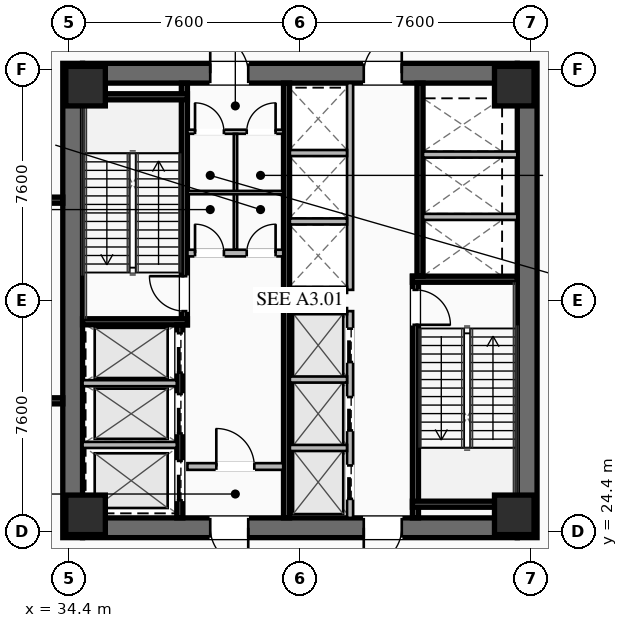
"""IFC4 building model, lengths in metres.
Left out: names, types, materials, properties, quantities, classifications, styles, units other than length and angle.
Written with IfcOpenShell. Run it as: python <this file> out.ifc"""

import sys

from ifc_helpers import new_model, si_unit, direction, frame, frame_2d, origin, origin_2d, place, context, subcontext, project, spatial, rectangle, hollow_rectangle, extrude, element, fill, save


model = new_model("IFC4")
c1 = context("Model", 3, precision=1e-05, world=origin(), true_north=direction((0.0, 1.0)))
c2 = subcontext(c1, "Body", "Model", "MODEL_VIEW")
j1 = project(units=[si_unit("LENGTHUNIT", "METRE"), si_unit("PLANEANGLEUNIT", "RADIAN")], contexts=[c1])
p1 = place(None, origin())
s1 = spatial("IfcSite", under=j1, at=p1, CompositionType="ELEMENT")
p2 = place(p1, origin())
s2 = spatial("IfcBuilding", under=s1, at=p2, CompositionType="ELEMENT")
p3 = place(p2, frame((0.0, 0.0, -5.5)))
s3 = spatial("IfcBuildingStorey", under=s2, at=p3, CompositionType="ELEMENT", Elevation=-5.5)
for number, where, z_axis, x_axis in (
    (1, (34.525, 24.2, 0.0), (0.0, 0.0, 1.0), (0.0, 1.0, 0.0)),
    (2, (49.475, 39.8, 0.0), (0.0, 0.0, 1.0), (0.0, -1.0, 0.0)),
):
    element("IfcWall", number, at=place(p3, frame(where, z_axis=z_axis, x_axis=x_axis)), inside=s3, PredefinedType="SHEAR", context=c2, shape_type="SweptSolid", body=[
        extrude(rectangle(XDim=15.6, YDim=0.65, at=frame_2d((7.8, 0.0))), origin(), (0.0, 0.0, 1.0), 5.5),
    ])
p4 = place(p3, frame((49.15, 24.525, 0.0), z_axis=(0.0, 0.0, 1.0), x_axis=(-1.0, 0.0, 0.0)))
e3 = element("IfcWall", 3, at=p4, inside=s3, PredefinedType="SHEAR", context=c2, shape_type="SweptSolid", body=[
    extrude(rectangle(XDim=14.3, YDim=0.65, at=frame_2d((7.15, 0.0))), origin(), (0.0, 0.0, 1.0), 5.5),
])
p5 = place(p4, frame((8.85, 0.0, 0.0)))
e4 = element("IfcOpeningElement", 4, at=p5, cuts=e3, PredefinedType="OPENING", context=c2, shape_type="SweptSolid", body=[
    extrude(rectangle(XDim=1.25, YDim=2.25, at=frame_2d((0.625, 1.125))), frame((0.0, 0.335, 0.0), z_axis=(0.0, -1.0, 0.0), x_axis=(1.0, 0.0, 0.0)), (0.0, 0.0, 1.0), 0.67),
])
p6 = place(p4, frame((3.8, 0.0, 0.0)))
e5 = element("IfcOpeningElement", 5, at=p6, cuts=e3, PredefinedType="OPENING", context=c2, shape_type="SweptSolid", body=[
    extrude(rectangle(XDim=1.25, YDim=2.25, at=frame_2d((0.625, 1.125))), frame((0.0, 0.335, 0.0), z_axis=(0.0, -1.0, 0.0), x_axis=(1.0, 0.0, 0.0)), (0.0, 0.0, 1.0), 0.67),
])
p7 = place(p3, frame((34.85, 39.475, 0.0), z_axis=(0.0, 0.0, 1.0), x_axis=(1.0, 0.0, 0.0)))
e6 = element("IfcWall", 6, at=p7, inside=s3, PredefinedType="SHEAR", context=c2, shape_type="SweptSolid", body=[
    extrude(rectangle(XDim=14.3, YDim=0.65, at=frame_2d((7.15, 0.0))), origin(), (0.0, 0.0, 1.0), 5.5),
])
p8 = place(p7, frame((4.2, 0.0, 0.0)))
e7 = element("IfcOpeningElement", 7, at=p8, cuts=e6, PredefinedType="OPENING", context=c2, shape_type="SweptSolid", body=[
    extrude(rectangle(XDim=1.25, YDim=2.25, at=frame_2d((0.625, 1.125))), frame((0.0, 0.335, 0.0), z_axis=(0.0, -1.0, 0.0), x_axis=(1.0, 0.0, 0.0)), (0.0, 0.0, 1.0), 0.67),
])
p9 = place(p7, frame((9.25, 0.0, 0.0)))
e8 = element("IfcOpeningElement", 8, at=p9, cuts=e6, PredefinedType="OPENING", context=c2, shape_type="SweptSolid", body=[
    extrude(rectangle(XDim=1.25, YDim=2.25, at=frame_2d((0.625, 1.125))), frame((0.0, 0.335, 0.0), z_axis=(0.0, -1.0, 0.0), x_axis=(1.0, 0.0, 0.0)), (0.0, 0.0, 1.0), 0.67),
])
for number, where, z_axis, x_axis in (
    (9, (34.95, 24.95, 0.0), (0.0, 0.0, 1.0), (1.0, 0.0, 0.0)),
    (10, (49.05, 24.95, 0.0), (0.0, 0.0, 1.0), (1.0, 0.0, 0.0)),
    (11, (49.05, 39.05, 0.0), (0.0, 0.0, 1.0), (1.0, 0.0, 0.0)),
    (12, (34.95, 39.05, 0.0), (0.0, 0.0, 1.0), (1.0, 0.0, 0.0)),
):
    element("IfcColumn", number, at=place(p3, frame(where, z_axis=z_axis, x_axis=x_axis)), inside=s3, PredefinedType="COLUMN", context=c2, shape_type="SweptSolid", body=[
        extrude(hollow_rectangle(XDim=1.3, YDim=1.3, WallThickness=0.05, at=origin_2d()), origin(), (0.0, 0.0, 1.0), 5.2),
    ])
p10 = place(p3, frame((38.2, 31.2, 0.0), z_axis=(0.0, 0.0, 1.0), x_axis=(0.0, 1.0, 0.0)))
e13 = element("IfcWall", 13, at=p10, inside=s3, PredefinedType="SHEAR", context=c2, shape_type="SweptSolid", body=[
    extrude(rectangle(XDim=7.95, YDim=0.2, at=frame_2d((3.975, 0.0))), origin(), (0.0, 0.0, 1.0), 5.2),
])
p11 = place(p10, frame((0.45, 0.0, 0.0)))
e14 = element("IfcOpeningElement", 14, at=p11, cuts=e13, PredefinedType="OPENING", context=c2, shape_type="SweptSolid", body=[
    extrude(rectangle(XDim=1.15, YDim=2.2, at=frame_2d((0.575, 1.1))), frame((0.0, 0.11, 0.0), z_axis=(0.0, -1.0, 0.0), x_axis=(1.0, 0.0, 0.0)), (0.0, 0.0, 1.0), 0.22),
])
for number, where, z_axis, x_axis in (
    (15, (34.85, 31.3, 0.0), (0.0, 0.0, 1.0), (1.0, 0.0, 0.0)),
    (16, (34.85, 38.7, 0.0), (0.0, 0.0, 1.0), (1.0, 0.0, 0.0)),
):
    element("IfcWall", number, at=place(p3, frame(where, z_axis=z_axis, x_axis=x_axis)), inside=s3, PredefinedType="SHEAR", context=c2, shape_type="SweptSolid", body=[
        extrude(rectangle(XDim=3.45, YDim=0.2, at=frame_2d((1.725, 0.0))), origin(), (0.0, 0.0, 1.0), 5.2),
    ])
p12 = place(p3, frame((45.8, 32.8, 0.0), z_axis=(0.0, 0.0, 1.0), x_axis=(0.0, -1.0, 0.0)))
e17 = element("IfcWall", 17, at=p12, inside=s3, PredefinedType="SHEAR", context=c2, shape_type="SweptSolid", body=[
    extrude(rectangle(XDim=7.95, YDim=0.2, at=frame_2d((3.975, 0.0))), origin(), (0.0, 0.0, 1.0), 5.2),
])
p13 = place(p12, frame((0.45, 0.0, 0.0)))
e18 = element("IfcOpeningElement", 18, at=p13, cuts=e17, PredefinedType="OPENING", context=c2, shape_type="SweptSolid", body=[
    extrude(rectangle(XDim=1.15, YDim=2.2, at=frame_2d((0.575, 1.1))), frame((0.0, 0.11, 0.0), z_axis=(0.0, -1.0, 0.0), x_axis=(1.0, 0.0, 0.0)), (0.0, 0.0, 1.0), 0.22),
])
for number, where, z_axis, x_axis in (
    (19, (45.7, 32.7, 0.0), (0.0, 0.0, 1.0), (1.0, 0.0, 0.0)),
    (20, (45.7, 25.3, 0.0), (0.0, 0.0, 1.0), (1.0, 0.0, 0.0)),
):
    element("IfcWall", number, at=place(p3, frame(where, z_axis=z_axis, x_axis=x_axis)), inside=s3, PredefinedType="SHEAR", context=c2, shape_type="SweptSolid", body=[
        extrude(rectangle(XDim=3.45, YDim=0.2, at=frame_2d((1.725, 0.0))), origin(), (0.0, 0.0, 1.0), 5.2),
    ])
p14 = place(p3, frame((41.56, 24.85, 0.0), z_axis=(0.0, 0.0, 1.0), x_axis=(0.0, 1.0, 0.0)))
e21 = element("IfcWall", 21, at=p14, inside=s3, PredefinedType="SHEAR", context=c2, shape_type="SweptSolid", body=[
    extrude(rectangle(XDim=14.3, YDim=0.2, at=frame_2d((7.15, 0.0))), origin(), (0.0, 0.0, 1.0), 5.2),
])
p15 = place(p3, frame((38.3, 33.56, 0.0), z_axis=(0.0, 0.0, 1.0), x_axis=(1.0, 0.0, 0.0)))
e22 = element("IfcWall", 22, at=p15, inside=s3, PredefinedType="SOLIDWALL", context=c2, shape_type="SweptSolid", body=[
    extrude(rectangle(XDim=3.15, YDim=0.22, at=frame_2d((1.575, 0.0))), origin(), (0.0, 0.0, 1.0), 4.243),
])
p16 = place(p15, frame((0.25, 0.0, 0.0)))
e23 = element("IfcOpeningElement", 23, at=p16, cuts=e22, PredefinedType="OPENING", context=c2, shape_type="SweptSolid", body=[
    extrude(rectangle(XDim=0.95, YDim=2.05, at=frame_2d((0.475, 1.025))), frame((0.0, 0.12, 0.0), z_axis=(0.0, -1.0, 0.0), x_axis=(1.0, 0.0, 0.0)), (0.0, 0.0, 1.0), 0.24),
])
p17 = place(p15, frame((1.95, 0.0, 0.0)))
e24 = element("IfcOpeningElement", 24, at=p17, cuts=e22, PredefinedType="OPENING", context=c2, shape_type="SweptSolid", body=[
    extrude(rectangle(XDim=0.95, YDim=2.05, at=frame_2d((0.475, 1.025))), frame((0.0, 0.12, 0.0), z_axis=(0.0, -1.0, 0.0), x_axis=(1.0, 0.0, 0.0)), (0.0, 0.0, 1.0), 0.24),
])
p18 = place(p3, frame((38.3, 26.54, 0.0), z_axis=(0.0, 0.0, 1.0), x_axis=(1.0, 0.0, 0.0)))
e25 = element("IfcWall", 25, at=p18, inside=s3, PredefinedType="SOLIDWALL", context=c2, shape_type="SweptSolid", body=[
    extrude(rectangle(XDim=3.15, YDim=0.22, at=frame_2d((1.575, 0.0))), origin(), (0.0, 0.0, 1.0), 4.243),
])
p19 = place(p18, frame((0.95, 0.0, 0.0)))
e26 = element("IfcOpeningElement", 26, at=p19, cuts=e25, PredefinedType="OPENING", context=c2, shape_type="SweptSolid", body=[
    extrude(rectangle(XDim=1.25, YDim=2.25, at=frame_2d((0.625, 1.125))), frame((0.0, 0.12, 0.0), z_axis=(0.0, -1.0, 0.0), x_axis=(1.0, 0.0, 0.0)), (0.0, 0.0, 1.0), 0.24),
])
p20 = place(p3, frame((38.05, 24.85, 0.0), z_axis=(0.0, 0.0, 1.0), x_axis=(0.0, 1.0, 0.0)))
e27 = element("IfcWall", 27, at=p20, inside=s3, PredefinedType="SHEAR", context=c2, shape_type="SweptSolid", body=[
    extrude(rectangle(XDim=6.35, YDim=0.2, at=frame_2d((3.175, 0.0))), origin(), (0.0, 0.0, 1.0), 5.2),
])
p21 = place(p20, frame((4.775, 0.0, 0.0)))
e28 = element("IfcOpeningElement", 28, at=p21, cuts=e27, PredefinedType="OPENING", context=c2, shape_type="SweptSolid", body=[
    extrude(rectangle(XDim=1.3, YDim=2.25, at=frame_2d((0.65, 1.125))), frame((0.0, 0.11, 0.0), z_axis=(0.0, -1.0, 0.0), x_axis=(1.0, 0.0, 0.0)), (0.0, 0.0, 1.0), 0.22),
])
p22 = place(p20, frame((2.775, 0.0, 0.0)))
e29 = element("IfcOpeningElement", 29, at=p22, cuts=e27, PredefinedType="OPENING", context=c2, shape_type="SweptSolid", body=[
    extrude(rectangle(XDim=1.3, YDim=2.25, at=frame_2d((0.65, 1.125))), frame((0.0, 0.11, 0.0), z_axis=(0.0, -1.0, 0.0), x_axis=(1.0, 0.0, 0.0)), (0.0, 0.0, 1.0), 0.22),
])
p23 = place(p20, frame((0.575, 0.0, 0.0)))
e30 = element("IfcOpeningElement", 30, at=p23, cuts=e27, PredefinedType="OPENING", context=c2, shape_type="SweptSolid", body=[
    extrude(rectangle(XDim=1.3, YDim=2.25, at=frame_2d((0.65, 1.125))), frame((0.0, 0.11, 0.0), z_axis=(0.0, -1.0, 0.0), x_axis=(1.0, 0.0, 0.0)), (0.0, 0.0, 1.0), 0.22),
])
for number, where, z_axis, x_axis in (
    (31, (34.85, 27.25, 0.0), (0.0, 0.0, 1.0), (1.0, 0.0, 0.0)),
    (32, (34.85, 29.28, 0.0), (0.0, 0.0, 1.0), (1.0, 0.0, 0.0)),
):
    element("IfcWall", number, at=place(p3, frame(where, z_axis=z_axis, x_axis=x_axis)), inside=s3, PredefinedType="SOLIDWALL", context=c2, shape_type="SweptSolid", body=[
        extrude(rectangle(XDim=3.1, YDim=0.2, at=frame_2d((1.55, 0.0))), origin(), (0.0, 0.0, 1.0), 5.2),
    ])
p24 = place(p3, frame((45.95, 39.15, 0.0), z_axis=(0.0, 0.0, 1.0), x_axis=(0.0, -1.0, 0.0)))
e33 = element("IfcWall", 33, at=p24, inside=s3, PredefinedType="SHEAR", context=c2, shape_type="SweptSolid", body=[
    extrude(rectangle(XDim=6.35, YDim=0.2, at=frame_2d((3.175, 0.0))), origin(), (0.0, 0.0, 1.0), 5.2),
])
for number, where, z_axis, x_axis in (
    (34, (46.05, 34.75, 0.0), (0.0, 0.0, 1.0), (1.0, 0.0, 0.0)),
    (35, (46.05, 36.8, 0.0), (0.0, 0.0, 1.0), (1.0, 0.0, 0.0)),
):
    element("IfcWall", number, at=place(p3, frame(where, z_axis=z_axis, x_axis=x_axis)), inside=s3, PredefinedType="SOLIDWALL", context=c2, shape_type="SweptSolid", body=[
        extrude(rectangle(XDim=3.1, YDim=0.2, at=frame_2d((1.55, 0.0))), origin(), (0.0, 0.0, 1.0), 5.2),
    ])
p25 = place(p3, frame((38.3, 37.55, 0.0), z_axis=(0.0, 0.0, 1.0), x_axis=(1.0, 0.0, 0.0)))
e36 = element("IfcWall", 36, at=p25, inside=s3, PredefinedType="PARTITIONING", context=c2, shape_type="SweptSolid", body=[
    extrude(rectangle(XDim=3.15, YDim=0.135, at=frame_2d((1.575, 0.0))), origin(), (0.0, 0.0, 1.0), 4.243),
])
p26 = place(p25, frame((0.25, 0.0, 0.0)))
e37 = element("IfcOpeningElement", 37, at=p26, cuts=e36, PredefinedType="OPENING", context=c2, shape_type="SweptSolid", body=[
    extrude(rectangle(XDim=0.95, YDim=2.05, at=frame_2d((0.475, 1.025))), frame((0.0, 0.077, 0.0), z_axis=(0.0, -1.0, 0.0), x_axis=(1.0, 0.0, 0.0)), (0.0, 0.0, 1.0), 0.155),
])
p27 = place(p25, frame((1.95, 0.0, 0.0)))
e38 = element("IfcOpeningElement", 38, at=p27, cuts=e36, PredefinedType="OPENING", context=c2, shape_type="SweptSolid", body=[
    extrude(rectangle(XDim=0.95, YDim=2.05, at=frame_2d((0.475, 1.025))), frame((0.0, 0.077, 0.0), z_axis=(0.0, -1.0, 0.0), x_axis=(1.0, 0.0, 0.0)), (0.0, 0.0, 1.0), 0.155),
])
p28 = place(p3, frame((39.88, 33.68, 0.0), z_axis=(0.0, 0.0, 1.0), x_axis=(0.0, 1.0, 0.0)))
e39 = element("IfcWall", 39, at=p28, inside=s3, PredefinedType="PARTITIONING", context=c2, shape_type="SweptSolid", body=[
    extrude(rectangle(XDim=3.8, YDim=0.11, at=frame_2d((1.9, 0.0))), origin(), (0.0, 0.0, 1.0), 4.243),
])
p29 = place(p3, frame((38.3, 35.55, 0.0), z_axis=(0.0, 0.0, 1.0), x_axis=(1.0, 0.0, 0.0)))
e40 = element("IfcWall", 40, at=p29, inside=s3, PredefinedType="PARTITIONING", context=c2, shape_type="SweptSolid", body=[
    extrude(rectangle(XDim=3.15, YDim=0.11, at=frame_2d((1.575, 0.0))), origin(), (0.0, 0.0, 1.0), 4.243),
])
p30 = place(p3, frame((43.65, 24.85, 0.0), z_axis=(0.0, 0.0, 1.0), x_axis=(0.0, 1.0, 0.0)))
e41 = element("IfcWall", 41, at=p30, inside=s3, PredefinedType="SOLIDWALL", context=c2, shape_type="SweptSolid", body=[
    extrude(rectangle(XDim=6.8, YDim=0.2, at=frame_2d((3.4, 0.0))), origin(), (0.0, 0.0, 1.0), 5.2),
])
p31 = place(p30, frame((0.625, 0.0, 0.0)))
e42 = element("IfcOpeningElement", 42, at=p31, cuts=e41, PredefinedType="OPENING", context=c2, shape_type="SweptSolid", body=[
    extrude(rectangle(XDim=1.1, YDim=2.2, at=frame_2d((0.55, 1.1))), frame((0.0, 0.11, 0.0), z_axis=(0.0, -1.0, 0.0), x_axis=(1.0, 0.0, 0.0)), (0.0, 0.0, 1.0), 0.22),
])
p32 = place(p30, frame((2.875, 0.0, 0.0)))
e43 = element("IfcOpeningElement", 43, at=p32, cuts=e41, PredefinedType="OPENING", context=c2, shape_type="SweptSolid", body=[
    extrude(rectangle(XDim=1.1, YDim=2.2, at=frame_2d((0.55, 1.1))), frame((0.0, 0.11, 0.0), z_axis=(0.0, -1.0, 0.0), x_axis=(1.0, 0.0, 0.0)), (0.0, 0.0, 1.0), 0.22),
])
p33 = place(p30, frame((5.125, 0.0, 0.0)))
e44 = element("IfcOpeningElement", 44, at=p33, cuts=e41, PredefinedType="OPENING", context=c2, shape_type="SweptSolid", body=[
    extrude(rectangle(XDim=1.1, YDim=2.2, at=frame_2d((0.55, 1.1))), frame((0.0, 0.11, 0.0), z_axis=(0.0, -1.0, 0.0), x_axis=(1.0, 0.0, 0.0)), (0.0, 0.0, 1.0), 0.22),
])
for number, where, z_axis, x_axis in (
    (45, (41.67, 27.15, 0.0), (0.0, 0.0, 1.0), (1.0, 0.0, 0.0)),
    (46, (41.67, 29.4, 0.0), (0.0, 0.0, 1.0), (1.0, 0.0, 0.0)),
    (47, (41.67, 31.65, 0.0), (0.0, 0.0, 1.0), (1.0, 0.0, 0.0)),
):
    element("IfcWall", number, at=place(p3, frame(where, z_axis=z_axis, x_axis=x_axis)), inside=s3, PredefinedType="SOLIDWALL", context=c2, shape_type="SweptSolid", body=[
        extrude(rectangle(XDim=1.88, YDim=0.2, at=frame_2d((0.94, 0.0))), origin(), (0.0, 0.0, 1.0), 5.2),
    ])
p34 = place(p3, frame((43.65, 32.35, 0.0), z_axis=(0.0, 0.0, 1.0), x_axis=(0.0, 1.0, 0.0)))
e48 = element("IfcWall", 48, at=p34, inside=s3, PredefinedType="SOLIDWALL", context=c2, shape_type="SweptSolid", body=[
    extrude(rectangle(XDim=6.8, YDim=0.2, at=frame_2d((3.4, 0.0))), origin(), (0.0, 0.0, 1.0), 5.2),
])
for number, where, z_axis, x_axis in (
    (49, (41.67, 32.35, 0.0), (0.0, 0.0, 1.0), (1.0, 0.0, 0.0)),
    (50, (41.67, 34.6, 0.0), (0.0, 0.0, 1.0), (1.0, 0.0, 0.0)),
    (51, (41.67, 36.85, 0.0), (0.0, 0.0, 1.0), (1.0, 0.0, 0.0)),
):
    element("IfcWall", number, at=place(p3, frame(where, z_axis=z_axis, x_axis=x_axis)), inside=s3, PredefinedType="SOLIDWALL", context=c2, shape_type="SweptSolid", body=[
        extrude(rectangle(XDim=1.88, YDim=0.2, at=frame_2d((0.94, 0.0))), origin(), (0.0, 0.0, 1.0), 5.2),
    ])
for number, where, z_axis, x_axis in (
    (52, (30.8, 35.3, 0.0), (0.0, 0.0, 1.0), (1.0, 0.0, 0.0)),
    (53, (30.8, 28.7, 0.0), (0.0, 0.0, 1.0), (1.0, 0.0, 0.0)),
):
    element("IfcWall", number, at=place(p3, frame(where, z_axis=z_axis, x_axis=x_axis)), inside=s3, PredefinedType="SHEAR", context=c2, shape_type="SweptSolid", body=[
        extrude(rectangle(XDim=3.4, YDim=0.2, at=frame_2d((1.7, 0.0))), origin(), (0.0, 0.0, 1.0), 5.2),
    ])
p35 = place(p8, origin())
e54 = element("IfcDoor", 54, at=p35, inside=s3, OperationType="SINGLE_SWING_LEFT", PredefinedType="DOOR", context=c2, shape_type="SweptSolid", body=[
    extrude(rectangle(XDim=1.25, YDim=2.25, at=frame_2d((0.625, 1.125))), frame((0.0, 0.025, 0.0), z_axis=(0.0, -1.0, 0.0), x_axis=(1.0, 0.0, 0.0)), (0.0, 0.0, 1.0), 0.05),
])
fill(e7, e54)
p36 = place(p9, origin())
e55 = element("IfcDoor", 55, at=p36, inside=s3, OperationType="SINGLE_SWING_RIGHT", PredefinedType="DOOR", context=c2, shape_type="SweptSolid", body=[
    extrude(rectangle(XDim=1.25, YDim=2.25, at=frame_2d((0.625, 1.125))), frame((0.0, 0.025, 0.0), z_axis=(0.0, -1.0, 0.0), x_axis=(1.0, 0.0, 0.0)), (0.0, 0.0, 1.0), 0.05),
])
fill(e8, e55)
p37 = place(p5, origin())
e56 = element("IfcDoor", 56, at=p37, inside=s3, OperationType="SINGLE_SWING_LEFT", PredefinedType="DOOR", context=c2, shape_type="SweptSolid", body=[
    extrude(rectangle(XDim=1.25, YDim=2.25, at=frame_2d((0.625, 1.125))), frame((0.0, 0.025, 0.0), z_axis=(0.0, -1.0, 0.0), x_axis=(1.0, 0.0, 0.0)), (0.0, 0.0, 1.0), 0.05),
])
fill(e4, e56)
p38 = place(p6, origin())
e57 = element("IfcDoor", 57, at=p38, inside=s3, OperationType="SINGLE_SWING_RIGHT", PredefinedType="DOOR", context=c2, shape_type="SweptSolid", body=[
    extrude(rectangle(XDim=1.25, YDim=2.25, at=frame_2d((0.625, 1.125))), frame((0.0, 0.025, 0.0), z_axis=(0.0, -1.0, 0.0), x_axis=(1.0, 0.0, 0.0)), (0.0, 0.0, 1.0), 0.05),
])
fill(e5, e57)
p39 = place(p11, origin())
e58 = element("IfcDoor", 58, at=p39, inside=s3, OperationType="SINGLE_SWING_RIGHT", PredefinedType="DOOR", context=c2, shape_type="SweptSolid", body=[
    extrude(rectangle(XDim=1.15, YDim=2.2, at=frame_2d((0.575, 1.1))), frame((0.0, 0.025, 0.0), z_axis=(0.0, -1.0, 0.0), x_axis=(1.0, 0.0, 0.0)), (0.0, 0.0, 1.0), 0.05),
])
fill(e14, e58)
p40 = place(p13, origin())
e59 = element("IfcDoor", 59, at=p40, inside=s3, OperationType="SINGLE_SWING_RIGHT", PredefinedType="DOOR", context=c2, shape_type="SweptSolid", body=[
    extrude(rectangle(XDim=1.15, YDim=2.2, at=frame_2d((0.575, 1.1))), frame((0.0, 0.025, 0.0), z_axis=(0.0, -1.0, 0.0), x_axis=(1.0, 0.0, 0.0)), (0.0, 0.0, 1.0), 0.05),
])
fill(e18, e59)
p41 = place(p19, origin())
e60 = element("IfcDoor", 60, at=p41, inside=s3, OperationType="SINGLE_SWING_LEFT", PredefinedType="DOOR", context=c2, shape_type="SweptSolid", body=[
    extrude(rectangle(XDim=1.25, YDim=2.25, at=frame_2d((0.625, 1.125))), frame((0.0, 0.025, 0.0), z_axis=(0.0, -1.0, 0.0), x_axis=(1.0, 0.0, 0.0)), (0.0, 0.0, 1.0), 0.05),
])
fill(e26, e60)
p42 = place(p26, origin())
e61 = element("IfcDoor", 61, at=p42, inside=s3, OperationType="SINGLE_SWING_LEFT", PredefinedType="DOOR", context=c2, shape_type="SweptSolid", body=[
    extrude(rectangle(XDim=0.95, YDim=2.05, at=frame_2d((0.475, 1.025))), frame((0.0, 0.025, 0.0), z_axis=(0.0, -1.0, 0.0), x_axis=(1.0, 0.0, 0.0)), (0.0, 0.0, 1.0), 0.05),
])
fill(e37, e61)
p43 = place(p27, origin())
e62 = element("IfcDoor", 62, at=p43, inside=s3, OperationType="SINGLE_SWING_RIGHT", PredefinedType="DOOR", context=c2, shape_type="SweptSolid", body=[
    extrude(rectangle(XDim=0.95, YDim=2.05, at=frame_2d((0.475, 1.025))), frame((0.0, 0.025, 0.0), z_axis=(0.0, -1.0, 0.0), x_axis=(1.0, 0.0, 0.0)), (0.0, 0.0, 1.0), 0.05),
])
fill(e38, e62)
p44 = place(p16, origin())
e63 = element("IfcDoor", 63, at=p44, inside=s3, OperationType="SINGLE_SWING_LEFT", PredefinedType="DOOR", context=c2, shape_type="SweptSolid", body=[
    extrude(rectangle(XDim=0.95, YDim=2.05, at=frame_2d((0.475, 1.025))), frame((0.0, 0.025, 0.0), z_axis=(0.0, -1.0, 0.0), x_axis=(1.0, 0.0, 0.0)), (0.0, 0.0, 1.0), 0.05),
])
fill(e23, e63)
p45 = place(p17, origin())
e64 = element("IfcDoor", 64, at=p45, inside=s3, OperationType="SINGLE_SWING_RIGHT", PredefinedType="DOOR", context=c2, shape_type="SweptSolid", body=[
    extrude(rectangle(XDim=0.95, YDim=2.05, at=frame_2d((0.475, 1.025))), frame((0.0, 0.025, 0.0), z_axis=(0.0, -1.0, 0.0), x_axis=(1.0, 0.0, 0.0)), (0.0, 0.0, 1.0), 0.05),
])
fill(e24, e64)
p46 = place(p21, origin())
e65 = element("IfcDoor", 65, at=p46, inside=s3, OperationType="SLIDING_TO_LEFT", PredefinedType="DOOR", context=c2, shape_type="SweptSolid", body=[
    extrude(rectangle(XDim=1.3, YDim=2.25, at=frame_2d((0.65, 1.125))), frame((0.0, 0.025, 0.0), z_axis=(0.0, -1.0, 0.0), x_axis=(1.0, 0.0, 0.0)), (0.0, 0.0, 1.0), 0.05),
])
fill(e28, e65)
p47 = place(p22, origin())
e66 = element("IfcDoor", 66, at=p47, inside=s3, OperationType="SLIDING_TO_LEFT", PredefinedType="DOOR", context=c2, shape_type="SweptSolid", body=[
    extrude(rectangle(XDim=1.3, YDim=2.25, at=frame_2d((0.65, 1.125))), frame((0.0, 0.025, 0.0), z_axis=(0.0, -1.0, 0.0), x_axis=(1.0, 0.0, 0.0)), (0.0, 0.0, 1.0), 0.05),
])
fill(e29, e66)
p48 = place(p23, origin())
e67 = element("IfcDoor", 67, at=p48, inside=s3, OperationType="SLIDING_TO_LEFT", PredefinedType="DOOR", context=c2, shape_type="SweptSolid", body=[
    extrude(rectangle(XDim=1.3, YDim=2.25, at=frame_2d((0.65, 1.125))), frame((0.0, 0.025, 0.0), z_axis=(0.0, -1.0, 0.0), x_axis=(1.0, 0.0, 0.0)), (0.0, 0.0, 1.0), 0.05),
])
fill(e30, e67)
p49 = place(p31, origin())
e68 = element("IfcDoor", 68, at=p49, inside=s3, OperationType="SLIDING_TO_LEFT", PredefinedType="DOOR", context=c2, shape_type="SweptSolid", body=[
    extrude(rectangle(XDim=1.1, YDim=2.2, at=frame_2d((0.55, 1.1))), frame((0.0, 0.025, 0.0), z_axis=(0.0, -1.0, 0.0), x_axis=(1.0, 0.0, 0.0)), (0.0, 0.0, 1.0), 0.05),
])
fill(e42, e68)
p50 = place(p32, origin())
e69 = element("IfcDoor", 69, at=p50, inside=s3, OperationType="SLIDING_TO_LEFT", PredefinedType="DOOR", context=c2, shape_type="SweptSolid", body=[
    extrude(rectangle(XDim=1.1, YDim=2.2, at=frame_2d((0.55, 1.1))), frame((0.0, 0.025, 0.0), z_axis=(0.0, -1.0, 0.0), x_axis=(1.0, 0.0, 0.0)), (0.0, 0.0, 1.0), 0.05),
])
fill(e43, e69)
p51 = place(p33, origin())
e70 = element("IfcDoor", 70, at=p51, inside=s3, OperationType="SLIDING_TO_LEFT", PredefinedType="DOOR", context=c2, shape_type="SweptSolid", body=[
    extrude(rectangle(XDim=1.1, YDim=2.2, at=frame_2d((0.55, 1.1))), frame((0.0, 0.025, 0.0), z_axis=(0.0, -1.0, 0.0), x_axis=(1.0, 0.0, 0.0)), (0.0, 0.0, 1.0), 0.05),
])
fill(e44, e70)
save(model, sys.argv[1])
